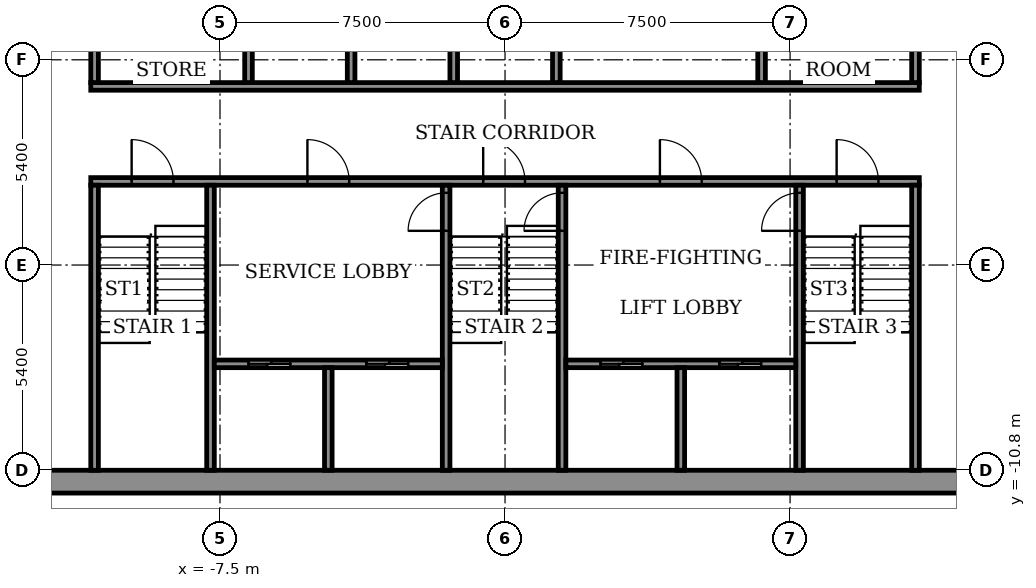
"""IFC4 building model, lengths in metres.
Left out: names, types, materials, properties, quantities, classifications, styles, units other than length and angle.
Written with IfcOpenShell. Run it as: python <this file> out.ifc"""

import sys

from ifc_helpers import new_model, si_unit, direction, frame, frame_2d, origin, place, context, subcontext, project, spatial, rectangle, extrude, element, fill, save


model = new_model("IFC4")
c1 = context("Model", 3, precision=1e-05, world=origin(), true_north=direction((0.0, 1.0)))
c2 = subcontext(c1, "Body", "Model", "MODEL_VIEW")
j1 = project(units=[si_unit("LENGTHUNIT", "METRE"), si_unit("PLANEANGLEUNIT", "RADIAN")], contexts=[c1])
p1 = place(None, origin())
s1 = spatial("IfcSite", under=j1, at=p1, CompositionType="ELEMENT")
p2 = place(p1, origin())
s2 = spatial("IfcBuilding", under=s1, at=p2, CompositionType="ELEMENT")
p3 = place(p2, frame((0.0, 0.0, 313.3)))
s3 = spatial("IfcBuildingStorey", under=s2, at=p3, CompositionType="ELEMENT", Elevation=313.3)
p4 = place(p3, frame((-14.4, -11.1, 0.0), z_axis=(0.0, 0.0, 1.0), x_axis=(1.0, 0.0, 0.0)))
e1 = element("IfcWall", 1, at=p4, inside=s3, PredefinedType="SHEAR", context=c2, shape_type="SweptSolid", body=[
    extrude(rectangle(XDim=28.8, YDim=0.6, at=frame_2d((14.4, 0.0))), origin(), (0.0, 0.0, 1.0), 3.6),
])
p5 = place(p3, frame((-10.9, -3.2, 0.0), z_axis=(0.0, 0.0, 1.0), x_axis=(1.0, 0.0, 0.0)))
e2 = element("IfcWall", 2, at=p5, inside=s3, PredefinedType="SHEAR", context=c2, shape_type="SweptSolid", body=[
    extrude(rectangle(XDim=21.8, YDim=0.2, at=frame_2d((10.9, 0.0))), origin(), (0.0, 0.0, 1.0), 3.05),
])
p6 = place(p5, frame((1.075, 0.0, 0.0)))
e3 = element("IfcOpeningElement", 3, at=p6, cuts=e2, PredefinedType="OPENING", context=c2, shape_type="SweptSolid", body=[
    extrude(rectangle(XDim=1.1, YDim=2.1, at=frame_2d((0.55, 1.05))), frame((0.0, 0.11, 0.0), z_axis=(0.0, -1.0, 0.0), x_axis=(1.0, 0.0, 0.0)), (0.0, 0.0, 1.0), 0.22),
])
p7 = place(p5, frame((10.325, 0.0, 0.0)))
e4 = element("IfcOpeningElement", 4, at=p7, cuts=e2, PredefinedType="OPENING", context=c2, shape_type="SweptSolid", body=[
    extrude(rectangle(XDim=1.1, YDim=2.1, at=frame_2d((0.55, 1.05))), frame((0.0, 0.11, 0.0), z_axis=(0.0, -1.0, 0.0), x_axis=(1.0, 0.0, 0.0)), (0.0, 0.0, 1.0), 0.22),
])
p8 = place(p5, frame((19.625, 0.0, 0.0)))
e5 = element("IfcOpeningElement", 5, at=p8, cuts=e2, PredefinedType="OPENING", context=c2, shape_type="SweptSolid", body=[
    extrude(rectangle(XDim=1.1, YDim=2.1, at=frame_2d((0.55, 1.05))), frame((0.0, 0.11, 0.0), z_axis=(0.0, -1.0, 0.0), x_axis=(1.0, 0.0, 0.0)), (0.0, 0.0, 1.0), 0.22),
])
p9 = place(p5, frame((5.7, 0.0, 0.0)))
e6 = element("IfcOpeningElement", 6, at=p9, cuts=e2, PredefinedType="OPENING", context=c2, shape_type="SweptSolid", body=[
    extrude(rectangle(XDim=1.1, YDim=2.1, at=frame_2d((0.55, 1.05))), frame((0.0, 0.11, 0.0), z_axis=(0.0, -1.0, 0.0), x_axis=(1.0, 0.0, 0.0)), (0.0, 0.0, 1.0), 0.22),
])
p10 = place(p5, frame((14.975, 0.0, 0.0)))
e7 = element("IfcOpeningElement", 7, at=p10, cuts=e2, PredefinedType="OPENING", context=c2, shape_type="SweptSolid", body=[
    extrude(rectangle(XDim=1.1, YDim=2.1, at=frame_2d((0.55, 1.05))), frame((0.0, 0.11, 0.0), z_axis=(0.0, -1.0, 0.0), x_axis=(1.0, 0.0, 0.0)), (0.0, 0.0, 1.0), 0.22),
])
p11 = place(p3, frame((-10.9, -0.7, 0.0), z_axis=(0.0, 0.0, 1.0), x_axis=(1.0, 0.0, 0.0)))
e8 = element("IfcWall", 8, at=p11, inside=s3, PredefinedType="SHEAR", context=c2, shape_type="SweptSolid", body=[
    extrude(rectangle(XDim=21.8, YDim=0.2, at=frame_2d((10.9, 0.0))), origin(), (0.0, 0.0, 1.0), 3.05),
])
for number, where, z_axis, x_axis in (
    (9, (-10.8, -10.8, 0.0), (0.0, 0.0, 1.0), (0.0, 1.0, 0.0)),
    (10, (-7.75, -10.8, 0.0), (0.0, 0.0, 1.0), (0.0, 1.0, 0.0)),
):
    element("IfcWall", number, at=place(p3, frame(where, z_axis=z_axis, x_axis=x_axis)), inside=s3, PredefinedType="SHEAR", context=c2, shape_type="SweptSolid", body=[
        extrude(rectangle(XDim=7.5, YDim=0.2, at=frame_2d((3.75, 0.0))), origin(), (0.0, 0.0, 1.0), 3.05),
    ])
p12 = place(p3, frame((-1.55, -10.8, 0.0), z_axis=(0.0, 0.0, 1.0), x_axis=(0.0, 1.0, 0.0)))
e11 = element("IfcWall", 11, at=p12, inside=s3, PredefinedType="SHEAR", context=c2, shape_type="SweptSolid", body=[
    extrude(rectangle(XDim=7.5, YDim=0.2, at=frame_2d((3.75, 0.0))), origin(), (0.0, 0.0, 1.0), 3.05),
])
p13 = place(p12, frame((6.3, 0.0, 0.0)))
e12 = element("IfcOpeningElement", 12, at=p13, cuts=e11, PredefinedType="OPENING", context=c2, shape_type="SweptSolid", body=[
    extrude(rectangle(XDim=1.0, YDim=2.1, at=frame_2d((0.5, 1.05))), frame((0.0, 0.11, 0.0), z_axis=(0.0, -1.0, 0.0), x_axis=(1.0, 0.0, 0.0)), (0.0, 0.0, 1.0), 0.22),
])
p14 = place(p3, frame((1.5, -10.8, 0.0), z_axis=(0.0, 0.0, 1.0), x_axis=(0.0, 1.0, 0.0)))
e13 = element("IfcWall", 13, at=p14, inside=s3, PredefinedType="SHEAR", context=c2, shape_type="SweptSolid", body=[
    extrude(rectangle(XDim=7.5, YDim=0.2, at=frame_2d((3.75, 0.0))), origin(), (0.0, 0.0, 1.0), 3.05),
])
p15 = place(p14, frame((6.3, 0.0, 0.0)))
e14 = element("IfcOpeningElement", 14, at=p15, cuts=e13, PredefinedType="OPENING", context=c2, shape_type="SweptSolid", body=[
    extrude(rectangle(XDim=1.0, YDim=2.1, at=frame_2d((0.5, 1.05))), frame((0.0, 0.11, 0.0), z_axis=(0.0, -1.0, 0.0), x_axis=(1.0, 0.0, 0.0)), (0.0, 0.0, 1.0), 0.22),
])
p16 = place(p3, frame((7.75, -10.8, 0.0), z_axis=(0.0, 0.0, 1.0), x_axis=(0.0, 1.0, 0.0)))
e15 = element("IfcWall", 15, at=p16, inside=s3, PredefinedType="SHEAR", context=c2, shape_type="SweptSolid", body=[
    extrude(rectangle(XDim=7.5, YDim=0.2, at=frame_2d((3.75, 0.0))), origin(), (0.0, 0.0, 1.0), 3.05),
])
p17 = place(p16, frame((6.3, 0.0, 0.0)))
e16 = element("IfcOpeningElement", 16, at=p17, cuts=e15, PredefinedType="OPENING", context=c2, shape_type="SweptSolid", body=[
    extrude(rectangle(XDim=1.0, YDim=2.1, at=frame_2d((0.5, 1.05))), frame((0.0, 0.11, 0.0), z_axis=(0.0, -1.0, 0.0), x_axis=(1.0, 0.0, 0.0)), (0.0, 0.0, 1.0), 0.22),
])
p18 = place(p3, frame((10.8, -10.8, 0.0), z_axis=(0.0, 0.0, 1.0), x_axis=(0.0, 1.0, 0.0)))
e17 = element("IfcWall", 17, at=p18, inside=s3, PredefinedType="SHEAR", context=c2, shape_type="SweptSolid", body=[
    extrude(rectangle(XDim=7.5, YDim=0.2, at=frame_2d((3.75, 0.0))), origin(), (0.0, 0.0, 1.0), 3.05),
])
p19 = place(p3, frame((-7.65, -8.0, 0.0), z_axis=(0.0, 0.0, 1.0), x_axis=(1.0, 0.0, 0.0)))
e18 = element("IfcWall", 18, at=p19, inside=s3, PredefinedType="SHEAR", context=c2, shape_type="SweptSolid", body=[
    extrude(rectangle(XDim=6.0, YDim=0.2, at=frame_2d((3.0, 0.0))), origin(), (0.0, 0.0, 1.0), 3.05),
])
p20 = place(p19, frame((0.9, 0.0, 0.0)))
e19 = element("IfcOpeningElement", 19, at=p20, cuts=e18, PredefinedType="OPENING", context=c2, shape_type="SweptSolid", body=[
    extrude(rectangle(XDim=1.1, YDim=2.1, at=frame_2d((0.55, 1.05))), frame((0.0, 0.11, 0.0), z_axis=(0.0, -1.0, 0.0), x_axis=(1.0, 0.0, 0.0)), (0.0, 0.0, 1.0), 0.22),
])
p21 = place(p19, frame((4.0, 0.0, 0.0)))
e20 = element("IfcOpeningElement", 20, at=p21, cuts=e18, PredefinedType="OPENING", context=c2, shape_type="SweptSolid", body=[
    extrude(rectangle(XDim=1.1, YDim=2.1, at=frame_2d((0.55, 1.05))), frame((0.0, 0.11, 0.0), z_axis=(0.0, -1.0, 0.0), x_axis=(1.0, 0.0, 0.0)), (0.0, 0.0, 1.0), 0.22),
])
p22 = place(p3, frame((-4.65, -10.8, 0.0), z_axis=(0.0, 0.0, 1.0), x_axis=(0.0, 1.0, 0.0)))
e21 = element("IfcWall", 21, at=p22, inside=s3, PredefinedType="SHEAR", context=c2, shape_type="SweptSolid", body=[
    extrude(rectangle(XDim=2.7, YDim=0.2, at=frame_2d((1.35, 0.0))), origin(), (0.0, 0.0, 1.0), 3.05),
])
p23 = place(p3, frame((1.6, -8.0, 0.0), z_axis=(0.0, 0.0, 1.0), x_axis=(1.0, 0.0, 0.0)))
e22 = element("IfcWall", 22, at=p23, inside=s3, PredefinedType="SHEAR", context=c2, shape_type="SweptSolid", body=[
    extrude(rectangle(XDim=6.05, YDim=0.2, at=frame_2d((3.025, 0.0))), origin(), (0.0, 0.0, 1.0), 3.05),
])
p24 = place(p23, frame((0.913, 0.0, 0.0)))
e23 = element("IfcOpeningElement", 23, at=p24, cuts=e22, PredefinedType="OPENING", context=c2, shape_type="SweptSolid", body=[
    extrude(rectangle(XDim=1.1, YDim=2.1, at=frame_2d((0.55, 1.05))), frame((0.0, 0.11, 0.0), z_axis=(0.0, -1.0, 0.0), x_axis=(1.0, 0.0, 0.0)), (0.0, 0.0, 1.0), 0.22),
])
p25 = place(p23, frame((4.038, 0.0, 0.0)))
e24 = element("IfcOpeningElement", 24, at=p25, cuts=e22, PredefinedType="OPENING", context=c2, shape_type="SweptSolid", body=[
    extrude(rectangle(XDim=1.1, YDim=2.1, at=frame_2d((0.55, 1.05))), frame((0.0, 0.11, 0.0), z_axis=(0.0, -1.0, 0.0), x_axis=(1.0, 0.0, 0.0)), (0.0, 0.0, 1.0), 0.22),
])
p26 = place(p3, frame((4.625, -10.8, 0.0), z_axis=(0.0, 0.0, 1.0), x_axis=(0.0, 1.0, 0.0)))
e25 = element("IfcWall", 25, at=p26, inside=s3, PredefinedType="SHEAR", context=c2, shape_type="SweptSolid", body=[
    extrude(rectangle(XDim=2.7, YDim=0.2, at=frame_2d((1.35, 0.0))), origin(), (0.0, 0.0, 1.0), 3.05),
])
p27 = place(p3, frame((-10.8, -0.6, 0.0), z_axis=(0.0, 0.0, 1.0), x_axis=(0.0, 1.0, 0.0)))
e26 = element("IfcWall", 26, at=p27, inside=s3, PredefinedType="STANDARD", context=c2, shape_type="SweptSolid", body=[
    extrude(rectangle(XDim=2.5, YDim=0.2, at=frame_2d((1.25, 0.0))), origin(), (0.0, 0.0, 1.0), 3.05),
])
for number, where, z_axis, x_axis in (
    (27, (-6.75, -0.6, 0.0), (0.0, 0.0, 1.0), (0.0, 1.0, 0.0)),
    (28, (-4.05, -0.6, 0.0), (0.0, 0.0, 1.0), (0.0, 1.0, 0.0)),
    (29, (-1.35, -0.6, 0.0), (0.0, 0.0, 1.0), (0.0, 1.0, 0.0)),
    (30, (1.35, -0.6, 0.0), (0.0, 0.0, 1.0), (0.0, 1.0, 0.0)),
):
    element("IfcWall", number, at=place(p3, frame(where, z_axis=z_axis, x_axis=x_axis)), inside=s3, PredefinedType="SHEAR", context=c2, shape_type="SweptSolid", body=[
        extrude(rectangle(XDim=2.5, YDim=0.2, at=frame_2d((1.25, 0.0))), origin(), (0.0, 0.0, 1.0), 3.05),
    ])
for number, where, z_axis, x_axis in (
    (31, (6.75, -0.6, 0.0), (0.0, 0.0, 1.0), (0.0, 1.0, 0.0)),
    (32, (10.8, -0.6, 0.0), (0.0, 0.0, 1.0), (0.0, 1.0, 0.0)),
):
    element("IfcWall", number, at=place(p3, frame(where, z_axis=z_axis, x_axis=x_axis)), inside=s3, PredefinedType="STANDARD", context=c2, shape_type="SweptSolid", body=[
        extrude(rectangle(XDim=2.5, YDim=0.2, at=frame_2d((1.25, 0.0))), origin(), (0.0, 0.0, 1.0), 3.05),
    ])
p28 = place(p24, origin())
e33 = element("IfcDoor", 33, at=p28, inside=s3, OperationType="SLIDING_TO_LEFT", PredefinedType="DOOR", context=c2, shape_type="SweptSolid", body=[
    extrude(rectangle(XDim=1.1, YDim=2.1, at=frame_2d((0.55, 1.05))), frame((0.0, 0.025, 0.0), z_axis=(0.0, -1.0, 0.0), x_axis=(1.0, 0.0, 0.0)), (0.0, 0.0, 1.0), 0.05),
])
fill(e23, e33)
p29 = place(p20, origin())
e34 = element("IfcDoor", 34, at=p29, inside=s3, OperationType="SLIDING_TO_LEFT", PredefinedType="DOOR", context=c2, shape_type="SweptSolid", body=[
    extrude(rectangle(XDim=1.1, YDim=2.1, at=frame_2d((0.55, 1.05))), frame((0.0, 0.025, 0.0), z_axis=(0.0, -1.0, 0.0), x_axis=(1.0, 0.0, 0.0)), (0.0, 0.0, 1.0), 0.05),
])
fill(e19, e34)
p30 = place(p25, origin())
e35 = element("IfcDoor", 35, at=p30, inside=s3, OperationType="SLIDING_TO_LEFT", PredefinedType="DOOR", context=c2, shape_type="SweptSolid", body=[
    extrude(rectangle(XDim=1.1, YDim=2.1, at=frame_2d((0.55, 1.05))), frame((0.0, 0.025, 0.0), z_axis=(0.0, -1.0, 0.0), x_axis=(1.0, 0.0, 0.0)), (0.0, 0.0, 1.0), 0.05),
])
fill(e24, e35)
p31 = place(p21, origin())
e36 = element("IfcDoor", 36, at=p31, inside=s3, OperationType="SLIDING_TO_LEFT", PredefinedType="DOOR", context=c2, shape_type="SweptSolid", body=[
    extrude(rectangle(XDim=1.1, YDim=2.1, at=frame_2d((0.55, 1.05))), frame((0.0, 0.025, 0.0), z_axis=(0.0, -1.0, 0.0), x_axis=(1.0, 0.0, 0.0)), (0.0, 0.0, 1.0), 0.05),
])
fill(e20, e36)
p32 = place(p6, origin())
e37 = element("IfcDoor", 37, at=p32, inside=s3, OperationType="SINGLE_SWING_RIGHT", PredefinedType="DOOR", context=c2, shape_type="SweptSolid", body=[
    extrude(rectangle(XDim=1.1, YDim=2.1, at=frame_2d((0.55, 1.05))), frame((0.0, 0.025, 0.0), z_axis=(0.0, -1.0, 0.0), x_axis=(1.0, 0.0, 0.0)), (0.0, 0.0, 1.0), 0.05),
])
fill(e3, e37)
p33 = place(p7, origin())
e38 = element("IfcDoor", 38, at=p33, inside=s3, OperationType="SINGLE_SWING_RIGHT", PredefinedType="DOOR", context=c2, shape_type="SweptSolid", body=[
    extrude(rectangle(XDim=1.1, YDim=2.1, at=frame_2d((0.55, 1.05))), frame((0.0, 0.025, 0.0), z_axis=(0.0, -1.0, 0.0), x_axis=(1.0, 0.0, 0.0)), (0.0, 0.0, 1.0), 0.05),
])
fill(e4, e38)
p34 = place(p8, origin())
e39 = element("IfcDoor", 39, at=p34, inside=s3, OperationType="SINGLE_SWING_RIGHT", PredefinedType="DOOR", context=c2, shape_type="SweptSolid", body=[
    extrude(rectangle(XDim=1.1, YDim=2.1, at=frame_2d((0.55, 1.05))), frame((0.0, 0.025, 0.0), z_axis=(0.0, -1.0, 0.0), x_axis=(1.0, 0.0, 0.0)), (0.0, 0.0, 1.0), 0.05),
])
fill(e5, e39)
p35 = place(p9, origin())
e40 = element("IfcDoor", 40, at=p35, inside=s3, OperationType="SINGLE_SWING_LEFT", PredefinedType="DOOR", context=c2, shape_type="SweptSolid", body=[
    extrude(rectangle(XDim=1.1, YDim=2.1, at=frame_2d((0.55, 1.05))), frame((0.0, 0.025, 0.0), z_axis=(0.0, -1.0, 0.0), x_axis=(1.0, 0.0, 0.0)), (0.0, 0.0, 1.0), 0.05),
])
fill(e6, e40)
p36 = place(p10, origin())
e41 = element("IfcDoor", 41, at=p36, inside=s3, OperationType="SINGLE_SWING_LEFT", PredefinedType="DOOR", context=c2, shape_type="SweptSolid", body=[
    extrude(rectangle(XDim=1.1, YDim=2.1, at=frame_2d((0.55, 1.05))), frame((0.0, 0.025, 0.0), z_axis=(0.0, -1.0, 0.0), x_axis=(1.0, 0.0, 0.0)), (0.0, 0.0, 1.0), 0.05),
])
fill(e7, e41)
p37 = place(p13, origin())
e42 = element("IfcDoor", 42, at=p37, inside=s3, OperationType="SINGLE_SWING_RIGHT", PredefinedType="DOOR", context=c2, shape_type="SweptSolid", body=[
    extrude(rectangle(XDim=1.0, YDim=2.1, at=frame_2d((0.5, 1.05))), frame((0.0, 0.025, 0.0), z_axis=(0.0, -1.0, 0.0), x_axis=(1.0, 0.0, 0.0)), (0.0, 0.0, 1.0), 0.05),
])
fill(e12, e42)
p38 = place(p15, origin())
e43 = element("IfcDoor", 43, at=p38, inside=s3, OperationType="SINGLE_SWING_RIGHT", PredefinedType="DOOR", context=c2, shape_type="SweptSolid", body=[
    extrude(rectangle(XDim=1.0, YDim=2.1, at=frame_2d((0.5, 1.05))), frame((0.0, 0.025, 0.0), z_axis=(0.0, -1.0, 0.0), x_axis=(1.0, 0.0, 0.0)), (0.0, 0.0, 1.0), 0.05),
])
fill(e14, e43)
p39 = place(p17, origin())
e44 = element("IfcDoor", 44, at=p39, inside=s3, OperationType="SINGLE_SWING_RIGHT", PredefinedType="DOOR", context=c2, shape_type="SweptSolid", body=[
    extrude(rectangle(XDim=1.0, YDim=2.1, at=frame_2d((0.5, 1.05))), frame((0.0, 0.025, 0.0), z_axis=(0.0, -1.0, 0.0), x_axis=(1.0, 0.0, 0.0)), (0.0, 0.0, 1.0), 0.05),
])
fill(e16, e44)
save(model, sys.argv[1])
